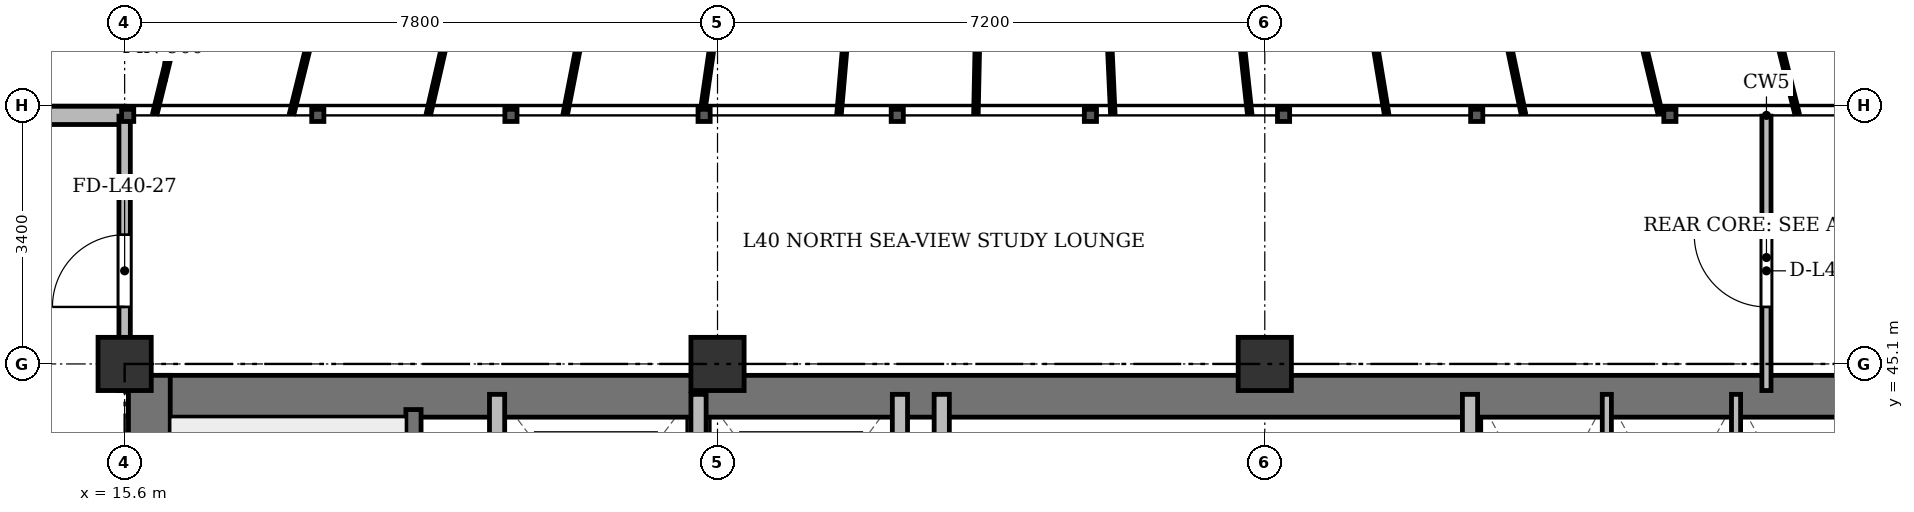
"""IFC4 building model, lengths in metres.
Left out: names, types, materials, properties, quantities, classifications, styles, units other than length and angle.
Written with IfcOpenShell. Run it as: python <this file> out.ifc"""

import sys

from ifc_helpers import new_model, si_unit, direction, frame, frame_2d, origin, origin_2d, place, context, subcontext, project, spatial, rectangle, extrude, source, transform, mapped, element, fill, save


model = new_model("IFC4")
c1 = context("Model", 3, precision=1e-05, world=origin(), true_north=direction((0.0, 1.0)))
c2 = subcontext(c1, "Body", "Model", "MODEL_VIEW")
j1 = project(units=[si_unit("LENGTHUNIT", "METRE"), si_unit("PLANEANGLEUNIT", "RADIAN")], contexts=[c1])
p1 = place(None, origin())
s1 = spatial("IfcSite", under=j1, at=p1, CompositionType="ELEMENT")
p2 = place(p1, origin())
s2 = spatial("IfcBuilding", under=s1, at=p2, CompositionType="ELEMENT")
p3 = place(p2, frame((0.0, 0.0, 153.7)))
s3 = spatial("IfcBuildingStorey", under=s2, at=p3, CompositionType="ELEMENT", Elevation=153.7)
m1 = source(origin(), c2, "Body", "SweptSolid", [
    extrude(rectangle(XDim=0.7, YDim=0.7, at=origin_2d()), origin(), (0.0, 0.0, 1.0), 3.6),
])
for number, where, z_axis, x_axis in (
    (1, (15.6, 45.1, 0.0), (0.0, 0.0, 1.0), (1.0, 0.0, 0.0)),
    (2, (23.4, 45.1, 0.0), (0.0, 0.0, 1.0), (1.0, 0.0, 0.0)),
    (3, (30.6, 45.1, 0.0), (0.0, 0.0, 1.0), (1.0, 0.0, 0.0)),
):
    element("IfcColumn", number, at=place(p3, frame(where, z_axis=z_axis, x_axis=x_axis)), inside=s3, PredefinedType="COLUMN", context=c2, shape_type="MappedRepresentation", body=[
        mapped(m1, transform((0.0, 0.0, 0.0), x_axis=(1.0, 0.0, 0.0), y_axis=(0.0, 1.0, 0.0), z_axis=(0.0, 0.0, 1.0), scale=1.0)),
    ])
p4 = place(p3, frame((10.9, 48.37, 0.0), z_axis=(0.0, 0.0, 1.0), x_axis=(1.0, 0.0, 0.0)))
e4 = element("IfcWall", 4, at=p4, inside=s3, PredefinedType="SOLIDWALL", context=c2, shape_type="SweptSolid", body=[
    extrude(rectangle(XDim=4.7, YDim=0.24, at=frame_2d((2.35, 0.0))), origin(), (0.0, 0.0, 1.0), 3.35),
])
p5 = place(p4, frame((1.659, 0.0, 0.9)))
e5 = element("IfcOpeningElement", 5, at=p5, cuts=e4, PredefinedType="OPENING", context=c2, shape_type="SweptSolid", body=[
    extrude(rectangle(XDim=1.2, YDim=1.65, at=frame_2d((0.6, 0.825))), frame((0.0, 0.13, 0.0), z_axis=(0.0, -1.0, 0.0), x_axis=(1.0, 0.0, 0.0)), (0.0, 0.0, 1.0), 0.26),
])
p6 = place(p3, frame((15.65, 44.675, 0.0), z_axis=(0.0, 0.0, 1.0), x_axis=(1.0, 0.0, 0.0)))
e6 = element("IfcWall", 6, at=p6, inside=s3, PredefinedType="SHEAR", context=c2, shape_type="SweptSolid", body=[
    extrude(rectangle(XDim=43.1, YDim=0.55, at=frame_2d((21.55, 0.0))), origin(), (0.0, 0.0, 1.0), 3.35),
])
p7 = place(p3, frame((15.925, 33.4, 0.0), z_axis=(0.0, 0.0, 1.0), x_axis=(0.0, 1.0, 0.0)))
e7 = element("IfcWall", 7, at=p7, inside=s3, PredefinedType="SHEAR", context=c2, shape_type="SweptSolid", body=[
    extrude(rectangle(XDim=11.55, YDim=0.55, at=frame_2d((5.775, 0.0))), origin(), (0.0, 0.0, 1.0), 3.35),
])
p8 = place(p3, frame((19.4, 33.4, 0.0), z_axis=(0.0, 0.0, 1.0), x_axis=(0.0, 1.0, 0.0)))
e8 = element("IfcWall", 8, at=p8, inside=s3, PredefinedType="SHEAR", context=c2, shape_type="SweptSolid", body=[
    extrude(rectangle(XDim=11.1, YDim=0.2, at=frame_2d((5.55, 0.0))), origin(), (0.0, 0.0, 1.0), 3.35),
])
p9 = place(p8, frame((0.85, 0.0, 0.0)))
e9 = element("IfcOpeningElement", 9, at=p9, cuts=e8, PredefinedType="OPENING", context=c2, shape_type="SweptSolid", body=[
    extrude(rectangle(XDim=1.1, YDim=2.15, at=frame_2d((0.55, 1.075))), frame((0.0, 0.11, 0.0), z_axis=(0.0, -1.0, 0.0), x_axis=(1.0, 0.0, 0.0)), (0.0, 0.0, 1.0), 0.22),
])
for number, where, z_axis, x_axis in (
    (10, (20.5, 41.3, 0.0), (0.0, 0.0, 1.0), (0.0, 1.0, 0.0)),
    (11, (23.15, 41.3, 0.0), (0.0, 0.0, 1.0), (0.0, 1.0, 0.0)),
    (12, (25.8, 41.3, 0.0), (0.0, 0.0, 1.0), (0.0, 1.0, 0.0)),
):
    element("IfcWall", number, at=place(p3, frame(where, z_axis=z_axis, x_axis=x_axis)), inside=s3, PredefinedType="SOLIDWALL", context=c2, shape_type="SweptSolid", body=[
        extrude(rectangle(XDim=3.4, YDim=0.2, at=frame_2d((1.7, 0.0))), origin(), (0.0, 0.0, 1.0), 3.35),
    ])
for number, where, z_axis, x_axis in (
    (13, (26.35, 33.4, 0.0), (0.0, 0.0, 1.0), (0.0, 1.0, 0.0)),
    (14, (33.3, 33.4, 0.0), (0.0, 0.0, 1.0), (0.0, 1.0, 0.0)),
):
    element("IfcWall", number, at=place(p3, frame(where, z_axis=z_axis, x_axis=x_axis)), inside=s3, PredefinedType="SOLIDWALL", context=c2, shape_type="SweptSolid", body=[
        extrude(rectangle(XDim=11.3, YDim=0.2, at=frame_2d((5.65, 0.0))), origin(), (0.0, 0.0, 1.0), 2.75),
    ])
for number, where, z_axis, x_axis in (
    (15, (35.1, 41.5, 0.0), (0.0, 0.0, 1.0), (0.0, 1.0, 0.0)),
    (16, (36.8, 41.5, 0.0), (0.0, 0.0, 1.0), (0.0, 1.0, 0.0)),
):
    element("IfcWall", number, at=place(p3, frame(where, z_axis=z_axis, x_axis=x_axis)), inside=s3, PredefinedType="PARTITIONING", context=c2, shape_type="SweptSolid", body=[
        extrude(rectangle(XDim=3.2, YDim=0.12, at=frame_2d((1.6, 0.0))), origin(), (0.0, 0.0, 1.0), 3.35),
    ])
p10 = place(p3, frame((37.2, 44.75, 0.0), z_axis=(0.0, 0.0, 1.0), x_axis=(0.0, 1.0, 0.0)))
e17 = element("IfcWall", 17, at=p10, inside=s3, PredefinedType="PARTITIONING", context=c2, shape_type="SweptSolid", body=[
    extrude(rectangle(XDim=3.61, YDim=0.12, at=frame_2d((1.805, 0.0))), origin(), (0.0, 0.0, 1.0), 2.75),
])
p11 = place(p10, frame((1.1, 0.0, 0.0)))
e18 = element("IfcOpeningElement", 18, at=p11, cuts=e17, PredefinedType="OPENING", context=c2, shape_type="SweptSolid", body=[
    extrude(rectangle(XDim=0.95, YDim=2.15, at=frame_2d((0.475, 1.075))), frame((0.0, 0.07, 0.0), z_axis=(0.0, -1.0, 0.0), x_axis=(1.0, 0.0, 0.0)), (0.0, 0.0, 1.0), 0.14),
])
p12 = place(p3, frame((15.6, 44.75, 0.0), z_axis=(0.0, 0.0, 1.0), x_axis=(0.0, 1.0, 0.0)))
e19 = element("IfcWall", 19, at=p12, inside=s3, PredefinedType="PARTITIONING", context=c2, shape_type="SweptSolid", body=[
    extrude(rectangle(XDim=3.61, YDim=0.15, at=frame_2d((1.805, 0.0))), origin(), (0.0, 0.0, 1.0), 2.85),
])
p13 = place(p12, frame((1.1, 0.0, 0.0)))
e20 = element("IfcOpeningElement", 20, at=p13, cuts=e19, PredefinedType="OPENING", context=c2, shape_type="SweptSolid", body=[
    extrude(rectangle(XDim=0.95, YDim=2.15, at=frame_2d((0.475, 1.075))), frame((0.0, 0.085, 0.0), z_axis=(0.0, -1.0, 0.0), x_axis=(1.0, 0.0, 0.0)), (0.0, 0.0, 1.0), 0.17),
])
m2 = source(origin(), c2, "Body", "SweptSolid", [
    extrude(rectangle(XDim=0.95, YDim=2.15, at=frame_2d((0.475, 1.075))), frame((0.0, 0.025, 0.0), z_axis=(0.0, -1.0, 0.0), x_axis=(1.0, 0.0, 0.0)), (0.0, 0.0, 1.0), 0.05),
])
p14 = place(p11, origin())
e21 = element("IfcDoor", 21, at=p14, inside=s3, OperationType="SINGLE_SWING_RIGHT", PredefinedType="DOOR", context=c2, shape_type="MappedRepresentation", body=[
    mapped(m2, transform((0.0, 0.0, 0.0), x_axis=(1.0, 0.0, 0.0), y_axis=(0.0, 1.0, 0.0), z_axis=(0.0, 0.0, 1.0), scale=1.0)),
])
fill(e18, e21)
p15 = place(p13, origin())
e22 = element("IfcDoor", 22, at=p15, inside=s3, OperationType="SINGLE_SWING_LEFT", PredefinedType="DOOR", context=c2, shape_type="MappedRepresentation", body=[
    mapped(m2, transform((0.0, 0.0, 0.0), x_axis=(1.0, 0.0, 0.0), y_axis=(0.0, 1.0, 0.0), z_axis=(0.0, 0.0, 1.0), scale=1.0)),
])
fill(e20, e22)
save(model, sys.argv[1])
